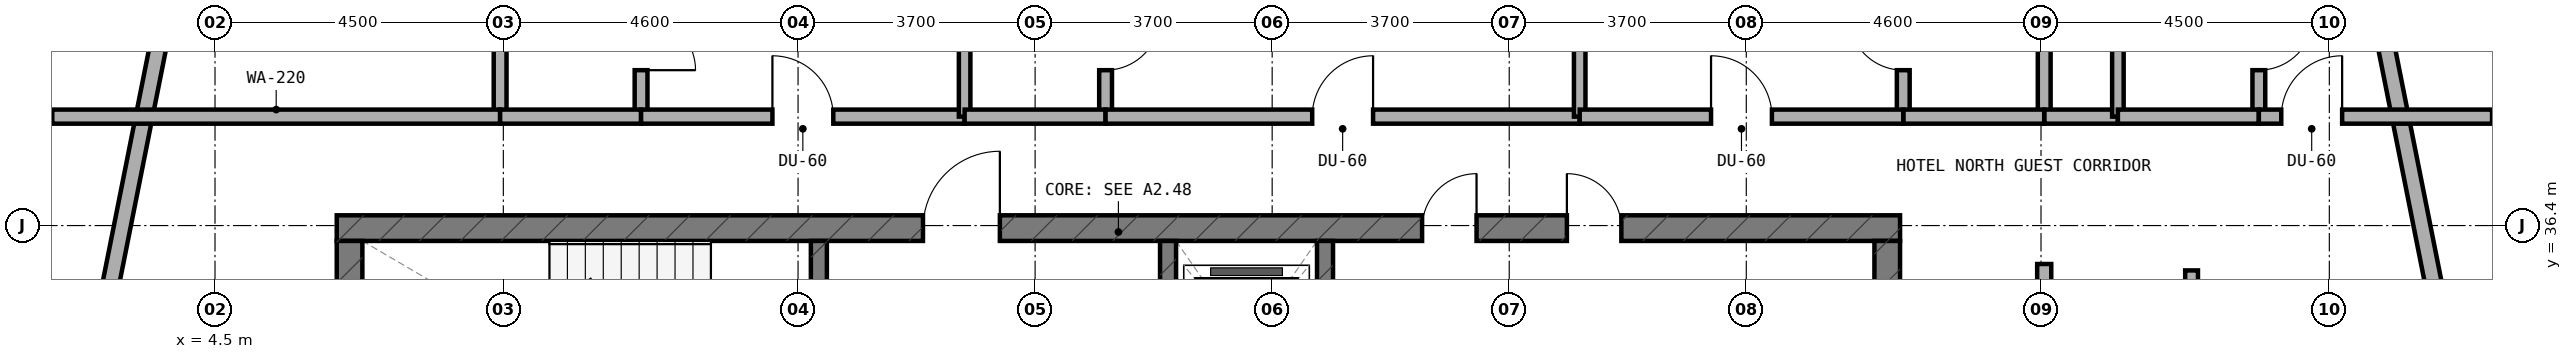
"""IFC4 building model, lengths in metres.
Left out: names, types, materials, properties, quantities, classifications, styles, units other than length and angle.
Written with IfcOpenShell. Run it as: python <this file> out.ifc"""

import sys

from ifc_helpers import new_model, si_unit, direction, frame, frame_2d, origin, place, context, subcontext, project, spatial, rectangle, extrude, element, fill, save


model = new_model("IFC4")
c1 = context("Model", 3, precision=1e-05, world=origin(), true_north=direction((0.0, 1.0)))
c2 = subcontext(c1, "Body", "Model", "MODEL_VIEW")
j1 = project(units=[si_unit("LENGTHUNIT", "METRE"), si_unit("PLANEANGLEUNIT", "RADIAN")], contexts=[c1])
p1 = place(None, origin())
s1 = spatial("IfcSite", under=j1, at=p1, CompositionType="ELEMENT")
p2 = place(p1, origin())
s2 = spatial("IfcBuilding", under=s1, at=p2, CompositionType="ELEMENT")
p3 = place(p2, frame((0.0, 0.0, 224.3)))
s3 = spatial("IfcBuildingStorey", under=s2, at=p3, CompositionType="ELEMENT", Elevation=224.3)
p4 = place(p3, frame((6.4, 36.36, 0.0), z_axis=(0.0, 0.0, 1.0), x_axis=(1.0, 0.0, 0.0)))
e1 = element("IfcWall", 1, at=p4, inside=s3, PredefinedType="SHEAR", context=c2, shape_type="SweptSolid", body=[
    extrude(rectangle(XDim=24.4, YDim=0.4, at=frame_2d((12.2, 0.0))), origin(), (0.0, 0.0, 1.0), 3.6),
])
p5 = place(p4, frame((9.15, 0.0, 0.0)))
e2 = element("IfcOpeningElement", 2, at=p5, cuts=e1, PredefinedType="OPENING", context=c2, shape_type="SweptSolid", body=[
    extrude(rectangle(XDim=1.2, YDim=2.15, at=frame_2d((0.6, 1.075))), frame((0.0, 0.21, 0.0), z_axis=(0.0, -1.0, 0.0), x_axis=(1.0, 0.0, 0.0)), (0.0, 0.0, 1.0), 0.42),
])
p6 = place(p4, frame((19.2, 0.0, 0.0)))
e3 = element("IfcOpeningElement", 3, at=p6, cuts=e1, PredefinedType="OPENING", context=c2, shape_type="SweptSolid", body=[
    extrude(rectangle(XDim=0.85, YDim=2.1, at=frame_2d((0.425, 1.05))), frame((0.0, 0.21, 0.0), z_axis=(0.0, -1.0, 0.0), x_axis=(1.0, 0.0, 0.0)), (0.0, 0.0, 1.0), 0.42),
])
p7 = place(p4, frame((16.94, 0.0, 0.0)))
e4 = element("IfcOpeningElement", 4, at=p7, cuts=e1, PredefinedType="OPENING", context=c2, shape_type="SweptSolid", body=[
    extrude(rectangle(XDim=0.85, YDim=2.1, at=frame_2d((0.425, 1.05))), frame((0.0, 0.21, 0.0), z_axis=(0.0, -1.0, 0.0), x_axis=(1.0, 0.0, 0.0)), (0.0, 0.0, 1.0), 0.42),
])
for number, where, z_axis, x_axis in (
    (5, (6.6, 33.0, 0.0), (0.0, 0.0, 1.0), (0.0, 1.0, 0.0)),
    (6, (30.6, 33.0, 0.0), (0.0, 0.0, 1.0), (0.0, 1.0, 0.0)),
):
    element("IfcWall", number, at=place(p3, frame(where, z_axis=z_axis, x_axis=x_axis)), inside=s3, PredefinedType="SHEAR", context=c2, shape_type="SweptSolid", body=[
        extrude(rectangle(XDim=3.16, YDim=0.4, at=frame_2d((1.58, 0.0))), origin(), (0.0, 0.0, 1.0), 3.6),
    ])
p8 = place(p3, frame((13.925, 33.0, 0.0), z_axis=(0.0, 0.0, 1.0), x_axis=(0.0, 1.0, 0.0)))
e7 = element("IfcWall", 7, at=p8, inside=s3, PredefinedType="STANDARD", context=c2, shape_type="SweptSolid", body=[
    extrude(rectangle(XDim=3.16, YDim=0.25, at=frame_2d((1.58, 0.0))), origin(), (0.0, 0.0, 1.0), 3.32),
])
p9 = place(p8, frame((0.98, 0.0, 0.0)))
e8 = element("IfcOpeningElement", 8, at=p9, cuts=e7, PredefinedType="OPENING", context=c2, shape_type="SweptSolid", body=[
    extrude(rectangle(XDim=1.1, YDim=2.15, at=frame_2d((0.55, 1.075))), frame((0.0, 0.135, 0.0), z_axis=(0.0, -1.0, 0.0), x_axis=(1.0, 0.0, 0.0)), (0.0, 0.0, 1.0), 0.27),
])
p10 = place(p3, frame((19.375, 33.0, 0.0), z_axis=(0.0, 0.0, 1.0), x_axis=(0.0, 1.0, 0.0)))
e9 = element("IfcWall", 9, at=p10, inside=s3, PredefinedType="STANDARD", context=c2, shape_type="SweptSolid", body=[
    extrude(rectangle(XDim=3.16, YDim=0.25, at=frame_2d((1.58, 0.0))), origin(), (0.0, 0.0, 1.0), 3.32),
])
p11 = place(p10, frame((0.98, 0.0, 0.0)))
e10 = element("IfcOpeningElement", 10, at=p11, cuts=e9, PredefinedType="OPENING", context=c2, shape_type="SweptSolid", body=[
    extrude(rectangle(XDim=1.1, YDim=2.15, at=frame_2d((0.55, 1.075))), frame((0.0, 0.135, 0.0), z_axis=(0.0, -1.0, 0.0), x_axis=(1.0, 0.0, 0.0)), (0.0, 0.0, 1.0), 0.27),
])
p12 = place(p3, frame((21.825, 33.0, 0.0), z_axis=(0.0, 0.0, 1.0), x_axis=(0.0, 1.0, 0.0)))
e11 = element("IfcWall", 11, at=p12, inside=s3, PredefinedType="STANDARD", context=c2, shape_type="SweptSolid", body=[
    extrude(rectangle(XDim=3.16, YDim=0.25, at=frame_2d((1.58, 0.0))), origin(), (0.0, 0.0, 1.0), 3.32),
])
p13 = place(p3, frame((40.084, 30.681, 0.0), z_axis=(0.0, 0.0, 1.0), x_axis=(-0.195291715883, 0.980745199176, 0.0)))
e12 = element("IfcWall", 12, at=p13, inside=s3, PredefinedType="STANDARD", context=c2, shape_type="SweptSolid", body=[
    extrude(rectangle(XDim=8.771, YDim=0.26, at=frame_2d((4.385, 0.0))), origin(), (0.0, 0.0, 1.0), 3.32),
])
p14 = place(p13, frame((2.67, 0.0, 0.85)))
e13 = element("IfcOpeningElement", 13, at=p14, cuts=e12, PredefinedType="OPENING", context=c2, shape_type="SweptSolid", body=[
    extrude(rectangle(XDim=2.1, YDim=1.5, at=frame_2d((1.05, 0.75))), frame((0.0, 0.14, 0.0), z_axis=(0.0, -1.0, 0.0), x_axis=(1.0, 0.0, 0.0)), (0.0, 0.0, 1.0), 0.28),
])
p15 = place(p3, frame((3.629, 39.283, 0.0), z_axis=(0.0, 0.0, 1.0), x_axis=(-0.195291715883, -0.980745199176, 0.0)))
e14 = element("IfcWall", 14, at=p15, inside=s3, PredefinedType="STANDARD", context=c2, shape_type="SweptSolid", body=[
    extrude(rectangle(XDim=8.771, YDim=0.26, at=frame_2d((4.385, 0.0))), origin(), (0.0, 0.0, 1.0), 3.32),
])
p16 = place(p15, frame((4.0, 0.0, 0.85)))
e15 = element("IfcOpeningElement", 15, at=p16, cuts=e14, PredefinedType="OPENING", context=c2, shape_type="SweptSolid", body=[
    extrude(rectangle(XDim=2.1, YDim=1.5, at=frame_2d((1.05, 0.75))), frame((0.0, 0.14, 0.0), z_axis=(0.0, -1.0, 0.0), x_axis=(1.0, 0.0, 0.0)), (0.0, 0.0, 1.0), 0.28),
])
p17 = place(p3, frame((11.15, 38.2, 0.0), z_axis=(0.0, 0.0, 1.0), x_axis=(0.0, 1.0, 0.0)))
e16 = element("IfcWall", 16, at=p17, inside=s3, PredefinedType="PLUMBINGWALL", context=c2, shape_type="SweptSolid", body=[
    extrude(rectangle(XDim=2.1, YDim=0.2, at=frame_2d((1.05, 0.0))), origin(), (0.0, 0.0, 1.0), 3.015),
])
p18 = place(p17, frame((0.625, 0.0, 0.0)))
e17 = element("IfcOpeningElement", 17, at=p18, cuts=e16, PredefinedType="OPENING", context=c2, shape_type="SweptSolid", body=[
    extrude(rectangle(XDim=0.85, YDim=2.1, at=frame_2d((0.425, 1.05))), frame((0.0, 0.11, 0.0), z_axis=(0.0, -1.0, 0.0), x_axis=(1.0, 0.0, 0.0)), (0.0, 0.0, 1.0), 0.22),
])
p19 = place(p3, frame((8.95, 38.2, 0.0), z_axis=(0.0, 0.0, 1.0), x_axis=(0.0, 1.0, 0.0)))
e18 = element("IfcWall", 18, at=p19, inside=s3, PredefinedType="PLUMBINGWALL", context=c2, shape_type="SweptSolid", body=[
    extrude(rectangle(XDim=2.1, YDim=0.2, at=frame_2d((1.05, 0.0))), origin(), (0.0, 0.0, 1.0), 3.015),
])
p20 = place(p3, frame((1.96, 38.1, 0.0), z_axis=(0.0, 0.0, 1.0), x_axis=(1.0, 0.0, 0.0)))
e19 = element("IfcWall", 19, at=p20, inside=s3, PredefinedType="SOLIDWALL", context=c2, shape_type="SweptSolid", body=[
    extrude(rectangle(XDim=6.99, YDim=0.22, at=frame_2d((3.495, 0.0))), origin(), (0.0, 0.0, 1.0), 2.695),
])
p21 = place(p3, frame((8.95, 38.1, 0.0), z_axis=(0.0, 0.0, 1.0), x_axis=(1.0, 0.0, 0.0)))
e20 = element("IfcWall", 20, at=p21, inside=s3, PredefinedType="SOLIDWALL", context=c2, shape_type="SweptSolid", body=[
    extrude(rectangle(XDim=2.2, YDim=0.22, at=frame_2d((1.1, 0.0))), origin(), (0.0, 0.0, 1.0), 3.32),
])
p22 = place(p3, frame((11.15, 38.1, 0.0), z_axis=(0.0, 0.0, 1.0), x_axis=(1.0, 0.0, 0.0)))
e21 = element("IfcWall", 21, at=p22, inside=s3, PredefinedType="SOLIDWALL", context=c2, shape_type="SweptSolid", body=[
    extrude(rectangle(XDim=5.05, YDim=0.22, at=frame_2d((2.525, 0.0))), origin(), (0.0, 0.0, 1.0), 2.695),
])
p23 = place(p22, frame((2.05, 0.0, 0.0)))
e22 = element("IfcOpeningElement", 22, at=p23, cuts=e21, PredefinedType="OPENING", context=c2, shape_type="SweptSolid", body=[
    extrude(rectangle(XDim=0.95, YDim=2.1, at=frame_2d((0.475, 1.05))), frame((0.0, 0.12, 0.0), z_axis=(0.0, -1.0, 0.0), x_axis=(1.0, 0.0, 0.0)), (0.0, 0.0, 1.0), 0.24),
])
p24 = place(p3, frame((16.2, 38.1, 0.0), z_axis=(0.0, 0.0, 1.0), x_axis=(0.0, 1.0, 0.0)))
e23 = element("IfcWall", 23, at=p24, inside=s3, PredefinedType="SOLIDWALL", context=c2, shape_type="SweptSolid", body=[
    extrude(rectangle(XDim=6.04, YDim=0.18, at=frame_2d((3.02, 0.0))), origin(), (0.0, 0.0, 1.0), 2.695),
])
p25 = place(p3, frame((18.4, 38.2, 0.0), z_axis=(0.0, 0.0, 1.0), x_axis=(0.0, 1.0, 0.0)))
e24 = element("IfcWall", 24, at=p25, inside=s3, PredefinedType="PLUMBINGWALL", context=c2, shape_type="SweptSolid", body=[
    extrude(rectangle(XDim=2.1, YDim=0.2, at=frame_2d((1.05, 0.0))), origin(), (0.0, 0.0, 1.0), 3.055),
])
p26 = place(p25, frame((0.625, 0.0, 0.0)))
e25 = element("IfcOpeningElement", 25, at=p26, cuts=e24, PredefinedType="OPENING", context=c2, shape_type="SweptSolid", body=[
    extrude(rectangle(XDim=0.85, YDim=2.1, at=frame_2d((0.425, 1.05))), frame((0.0, 0.11, 0.0), z_axis=(0.0, -1.0, 0.0), x_axis=(1.0, 0.0, 0.0)), (0.0, 0.0, 1.0), 0.22),
])
p27 = place(p3, frame((16.2, 38.1, 0.0), z_axis=(0.0, 0.0, 1.0), x_axis=(1.0, 0.0, 0.0)))
e26 = element("IfcWall", 26, at=p27, inside=s3, PredefinedType="SOLIDWALL", context=c2, shape_type="SweptSolid", body=[
    extrude(rectangle(XDim=2.2, YDim=0.22, at=frame_2d((1.1, 0.0))), origin(), (0.0, 0.0, 1.0), 2.695),
])
p28 = place(p3, frame((18.4, 38.1, 0.0), z_axis=(0.0, 0.0, 1.0), x_axis=(1.0, 0.0, 0.0)))
e27 = element("IfcWall", 27, at=p28, inside=s3, PredefinedType="SOLIDWALL", context=c2, shape_type="SweptSolid", body=[
    extrude(rectangle(XDim=7.4, YDim=0.22, at=frame_2d((3.7, 0.0))), origin(), (0.0, 0.0, 1.0), 2.695),
])
p29 = place(p28, frame((3.225, 0.0, 0.0)))
e28 = element("IfcOpeningElement", 28, at=p29, cuts=e27, PredefinedType="OPENING", context=c2, shape_type="SweptSolid", body=[
    extrude(rectangle(XDim=0.95, YDim=2.1, at=frame_2d((0.475, 1.05))), frame((0.0, 0.12, 0.0), z_axis=(0.0, -1.0, 0.0), x_axis=(1.0, 0.0, 0.0)), (0.0, 0.0, 1.0), 0.24),
])
p30 = place(p3, frame((25.8, 38.1, 0.0), z_axis=(0.0, 0.0, 1.0), x_axis=(0.0, 1.0, 0.0)))
e29 = element("IfcWall", 29, at=p30, inside=s3, PredefinedType="SOLIDWALL", context=c2, shape_type="SweptSolid", body=[
    extrude(rectangle(XDim=6.04, YDim=0.18, at=frame_2d((3.02, 0.0))), origin(), (0.0, 0.0, 1.0), 2.695),
])
p31 = place(p3, frame((30.85, 38.2, 0.0), z_axis=(0.0, 0.0, 1.0), x_axis=(0.0, 1.0, 0.0)))
e30 = element("IfcWall", 30, at=p31, inside=s3, PredefinedType="PLUMBINGWALL", context=c2, shape_type="SweptSolid", body=[
    extrude(rectangle(XDim=2.1, YDim=0.2, at=frame_2d((1.05, 0.0))), origin(), (0.0, 0.0, 1.0), 3.015),
])
p32 = place(p31, frame((0.625, 0.0, 0.0)))
e31 = element("IfcOpeningElement", 31, at=p32, cuts=e30, PredefinedType="OPENING", context=c2, shape_type="SweptSolid", body=[
    extrude(rectangle(XDim=0.85, YDim=2.1, at=frame_2d((0.425, 1.05))), frame((0.0, 0.11, 0.0), z_axis=(0.0, -1.0, 0.0), x_axis=(1.0, 0.0, 0.0)), (0.0, 0.0, 1.0), 0.22),
])
p33 = place(p3, frame((33.05, 38.2, 0.0), z_axis=(0.0, 0.0, 1.0), x_axis=(0.0, 1.0, 0.0)))
e32 = element("IfcWall", 32, at=p33, inside=s3, PredefinedType="PLUMBINGWALL", context=c2, shape_type="SweptSolid", body=[
    extrude(rectangle(XDim=2.1, YDim=0.2, at=frame_2d((1.05, 0.0))), origin(), (0.0, 0.0, 1.0), 3.015),
])
p34 = place(p3, frame((33.05, 38.1, 0.0), z_axis=(0.0, 0.0, 1.0), x_axis=(1.0, 0.0, 0.0)))
e33 = element("IfcWall", 33, at=p34, inside=s3, PredefinedType="SOLIDWALL", context=c2, shape_type="SweptSolid", body=[
    extrude(rectangle(XDim=1.15, YDim=0.22, at=frame_2d((0.575, 0.0))), origin(), (0.0, 0.0, 1.0), 2.695),
])
p35 = place(p3, frame((30.85, 38.1, 0.0), z_axis=(0.0, 0.0, 1.0), x_axis=(1.0, 0.0, 0.0)))
e34 = element("IfcWall", 34, at=p35, inside=s3, PredefinedType="SOLIDWALL", context=c2, shape_type="SweptSolid", body=[
    extrude(rectangle(XDim=2.2, YDim=0.22, at=frame_2d((1.1, 0.0))), origin(), (0.0, 0.0, 1.0), 3.32),
])
p36 = place(p3, frame((25.8, 38.1, 0.0), z_axis=(0.0, 0.0, 1.0), x_axis=(1.0, 0.0, 0.0)))
e35 = element("IfcWall", 35, at=p36, inside=s3, PredefinedType="SOLIDWALL", context=c2, shape_type="SweptSolid", body=[
    extrude(rectangle(XDim=5.05, YDim=0.22, at=frame_2d((2.525, 0.0))), origin(), (0.0, 0.0, 1.0), 2.695),
])
p37 = place(p36, frame((2.05, 0.0, 0.0)))
e36 = element("IfcOpeningElement", 36, at=p37, cuts=e35, PredefinedType="OPENING", context=c2, shape_type="SweptSolid", body=[
    extrude(rectangle(XDim=0.95, YDim=2.1, at=frame_2d((0.475, 1.05))), frame((0.0, 0.12, 0.0), z_axis=(0.0, -1.0, 0.0), x_axis=(1.0, 0.0, 0.0)), (0.0, 0.0, 1.0), 0.24),
])
p38 = place(p3, frame((34.2, 38.1, 0.0), z_axis=(0.0, 0.0, 1.0), x_axis=(0.0, 1.0, 0.0)))
e37 = element("IfcWall", 37, at=p38, inside=s3, PredefinedType="SOLIDWALL", context=c2, shape_type="SweptSolid", body=[
    extrude(rectangle(XDim=4.558, YDim=0.18, at=frame_2d((2.279, 0.0))), origin(), (0.0, 0.0, 1.0), 2.695),
])
p39 = place(p3, frame((36.4, 38.2, 0.0), z_axis=(0.0, 0.0, 1.0), x_axis=(0.0, 1.0, 0.0)))
e38 = element("IfcWall", 38, at=p39, inside=s3, PredefinedType="PLUMBINGWALL", context=c2, shape_type="SweptSolid", body=[
    extrude(rectangle(XDim=2.1, YDim=0.2, at=frame_2d((1.05, 0.0))), origin(), (0.0, 0.0, 1.0), 3.32),
])
p40 = place(p39, frame((0.625, 0.0, 0.0)))
e39 = element("IfcOpeningElement", 39, at=p40, cuts=e38, PredefinedType="OPENING", context=c2, shape_type="SweptSolid", body=[
    extrude(rectangle(XDim=0.85, YDim=2.1, at=frame_2d((0.425, 1.05))), frame((0.0, 0.11, 0.0), z_axis=(0.0, -1.0, 0.0), x_axis=(1.0, 0.0, 0.0)), (0.0, 0.0, 1.0), 0.22),
])
p41 = place(p3, frame((34.2, 38.1, 0.0), z_axis=(0.0, 0.0, 1.0), x_axis=(1.0, 0.0, 0.0)))
e40 = element("IfcWall", 40, at=p41, inside=s3, PredefinedType="SOLIDWALL", context=c2, shape_type="SweptSolid", body=[
    extrude(rectangle(XDim=2.2, YDim=0.22, at=frame_2d((1.1, 0.0))), origin(), (0.0, 0.0, 1.0), 2.695),
])
p42 = place(p3, frame((36.4, 38.1, 0.0), z_axis=(0.0, 0.0, 1.0), x_axis=(1.0, 0.0, 0.0)))
e41 = element("IfcWall", 41, at=p42, inside=s3, PredefinedType="SOLIDWALL", context=c2, shape_type="SweptSolid", body=[
    extrude(rectangle(XDim=3.64, YDim=0.22, at=frame_2d((1.82, 0.0))), origin(), (0.0, 0.0, 1.0), 3.32),
])
p43 = place(p42, frame((0.35, 0.0, 0.0)))
e42 = element("IfcOpeningElement", 42, at=p43, cuts=e41, PredefinedType="OPENING", context=c2, shape_type="SweptSolid", body=[
    extrude(rectangle(XDim=0.95, YDim=2.1, at=frame_2d((0.475, 1.05))), frame((0.0, 0.12, 0.0), z_axis=(0.0, -1.0, 0.0), x_axis=(1.0, 0.0, 0.0)), (0.0, 0.0, 1.0), 0.24),
])
p44 = place(p3, frame((35.35, 33.7, 0.0), z_axis=(0.0, 0.0, 1.0), x_axis=(0.0, 1.0, 0.0)))
e43 = element("IfcWall", 43, at=p44, inside=s3, PredefinedType="PLUMBINGWALL", context=c2, shape_type="SweptSolid", body=[
    extrude(rectangle(XDim=2.0, YDim=0.2, at=frame_2d((1.0, 0.0))), origin(), (0.0, 0.0, 1.0), 3.015),
])
p45 = place(p3, frame((33.05, 33.6, 0.0), z_axis=(0.0, 0.0, 1.0), x_axis=(0.0, 1.0, 0.0)))
e44 = element("IfcWall", 44, at=p45, inside=s3, PredefinedType="SOLIDWALL", context=c2, shape_type="SweptSolid", body=[
    extrude(rectangle(XDim=2.2, YDim=0.22, at=frame_2d((1.1, 0.0))), origin(), (0.0, 0.0, 1.0), 3.32),
])
p46 = place(p5, origin())
e45 = element("IfcDoor", 45, at=p46, inside=s3, OperationType="SINGLE_SWING_RIGHT", PredefinedType="DOOR", context=c2, shape_type="SweptSolid", body=[
    extrude(rectangle(XDim=1.2, YDim=2.15, at=frame_2d((0.6, 1.075))), frame((0.0, 0.025, 0.0), z_axis=(0.0, -1.0, 0.0), x_axis=(1.0, 0.0, 0.0)), (0.0, 0.0, 1.0), 0.05),
])
fill(e2, e45)
p47 = place(p6, origin())
e46 = element("IfcDoor", 46, at=p47, inside=s3, OperationType="SINGLE_SWING_LEFT", PredefinedType="DOOR", context=c2, shape_type="SweptSolid", body=[
    extrude(rectangle(XDim=0.85, YDim=2.1, at=frame_2d((0.425, 1.05))), frame((0.0, 0.025, 0.0), z_axis=(0.0, -1.0, 0.0), x_axis=(1.0, 0.0, 0.0)), (0.0, 0.0, 1.0), 0.05),
])
fill(e3, e46)
p48 = place(p7, origin())
e47 = element("IfcDoor", 47, at=p48, inside=s3, OperationType="SINGLE_SWING_RIGHT", PredefinedType="DOOR", context=c2, shape_type="SweptSolid", body=[
    extrude(rectangle(XDim=0.85, YDim=2.1, at=frame_2d((0.425, 1.05))), frame((0.0, 0.025, 0.0), z_axis=(0.0, -1.0, 0.0), x_axis=(1.0, 0.0, 0.0)), (0.0, 0.0, 1.0), 0.05),
])
fill(e4, e47)
p49 = place(p18, frame((0.85, 0.0, 0.0), z_axis=(0.0, 0.0, 1.0), x_axis=(-1.0, 0.0, 0.0)))
e48 = element("IfcDoor", 48, at=p49, inside=s3, OperationType="SINGLE_SWING_RIGHT", PredefinedType="DOOR", context=c2, shape_type="SweptSolid", body=[
    extrude(rectangle(XDim=0.85, YDim=2.1, at=frame_2d((0.425, 1.05))), frame((0.0, 0.025, 0.0), z_axis=(0.0, -1.0, 0.0), x_axis=(1.0, 0.0, 0.0)), (0.0, 0.0, 1.0), 0.05),
])
fill(e17, e48)
p50 = place(p23, origin())
e49 = element("IfcDoor", 49, at=p50, inside=s3, OperationType="SINGLE_SWING_LEFT", PredefinedType="DOOR", context=c2, shape_type="SweptSolid", body=[
    extrude(rectangle(XDim=0.95, YDim=2.1, at=frame_2d((0.475, 1.05))), frame((0.0, 0.025, 0.0), z_axis=(0.0, -1.0, 0.0), x_axis=(1.0, 0.0, 0.0)), (0.0, 0.0, 1.0), 0.05),
])
fill(e22, e49)
p51 = place(p26, frame((0.85, 0.0, 0.0), z_axis=(0.0, 0.0, 1.0), x_axis=(-1.0, 0.0, 0.0)))
e50 = element("IfcDoor", 50, at=p51, inside=s3, OperationType="SINGLE_SWING_LEFT", PredefinedType="DOOR", context=c2, shape_type="SweptSolid", body=[
    extrude(rectangle(XDim=0.85, YDim=2.1, at=frame_2d((0.425, 1.05))), frame((0.0, 0.025, 0.0), z_axis=(0.0, -1.0, 0.0), x_axis=(1.0, 0.0, 0.0)), (0.0, 0.0, 1.0), 0.05),
])
fill(e25, e50)
p52 = place(p29, origin())
e51 = element("IfcDoor", 51, at=p52, inside=s3, OperationType="SINGLE_SWING_RIGHT", PredefinedType="DOOR", context=c2, shape_type="SweptSolid", body=[
    extrude(rectangle(XDim=0.95, YDim=2.1, at=frame_2d((0.475, 1.05))), frame((0.0, 0.025, 0.0), z_axis=(0.0, -1.0, 0.0), x_axis=(1.0, 0.0, 0.0)), (0.0, 0.0, 1.0), 0.05),
])
fill(e28, e51)
p53 = place(p32, origin())
e52 = element("IfcDoor", 52, at=p53, inside=s3, OperationType="SINGLE_SWING_RIGHT", PredefinedType="DOOR", context=c2, shape_type="SweptSolid", body=[
    extrude(rectangle(XDim=0.85, YDim=2.1, at=frame_2d((0.425, 1.05))), frame((0.0, 0.025, 0.0), z_axis=(0.0, -1.0, 0.0), x_axis=(1.0, 0.0, 0.0)), (0.0, 0.0, 1.0), 0.05),
])
fill(e31, e52)
p54 = place(p37, origin())
e53 = element("IfcDoor", 53, at=p54, inside=s3, OperationType="SINGLE_SWING_LEFT", PredefinedType="DOOR", context=c2, shape_type="SweptSolid", body=[
    extrude(rectangle(XDim=0.95, YDim=2.1, at=frame_2d((0.475, 1.05))), frame((0.0, 0.025, 0.0), z_axis=(0.0, -1.0, 0.0), x_axis=(1.0, 0.0, 0.0)), (0.0, 0.0, 1.0), 0.05),
])
fill(e36, e53)
p55 = place(p40, frame((0.85, 0.0, 0.0), z_axis=(0.0, 0.0, 1.0), x_axis=(-1.0, 0.0, 0.0)))
e54 = element("IfcDoor", 54, at=p55, inside=s3, OperationType="SINGLE_SWING_LEFT", PredefinedType="DOOR", context=c2, shape_type="SweptSolid", body=[
    extrude(rectangle(XDim=0.85, YDim=2.1, at=frame_2d((0.425, 1.05))), frame((0.0, 0.025, 0.0), z_axis=(0.0, -1.0, 0.0), x_axis=(1.0, 0.0, 0.0)), (0.0, 0.0, 1.0), 0.05),
])
fill(e39, e54)
p56 = place(p43, origin())
e55 = element("IfcDoor", 55, at=p56, inside=s3, OperationType="SINGLE_SWING_RIGHT", PredefinedType="DOOR", context=c2, shape_type="SweptSolid", body=[
    extrude(rectangle(XDim=0.95, YDim=2.1, at=frame_2d((0.475, 1.05))), frame((0.0, 0.025, 0.0), z_axis=(0.0, -1.0, 0.0), x_axis=(1.0, 0.0, 0.0)), (0.0, 0.0, 1.0), 0.05),
])
fill(e42, e55)
save(model, sys.argv[1])
